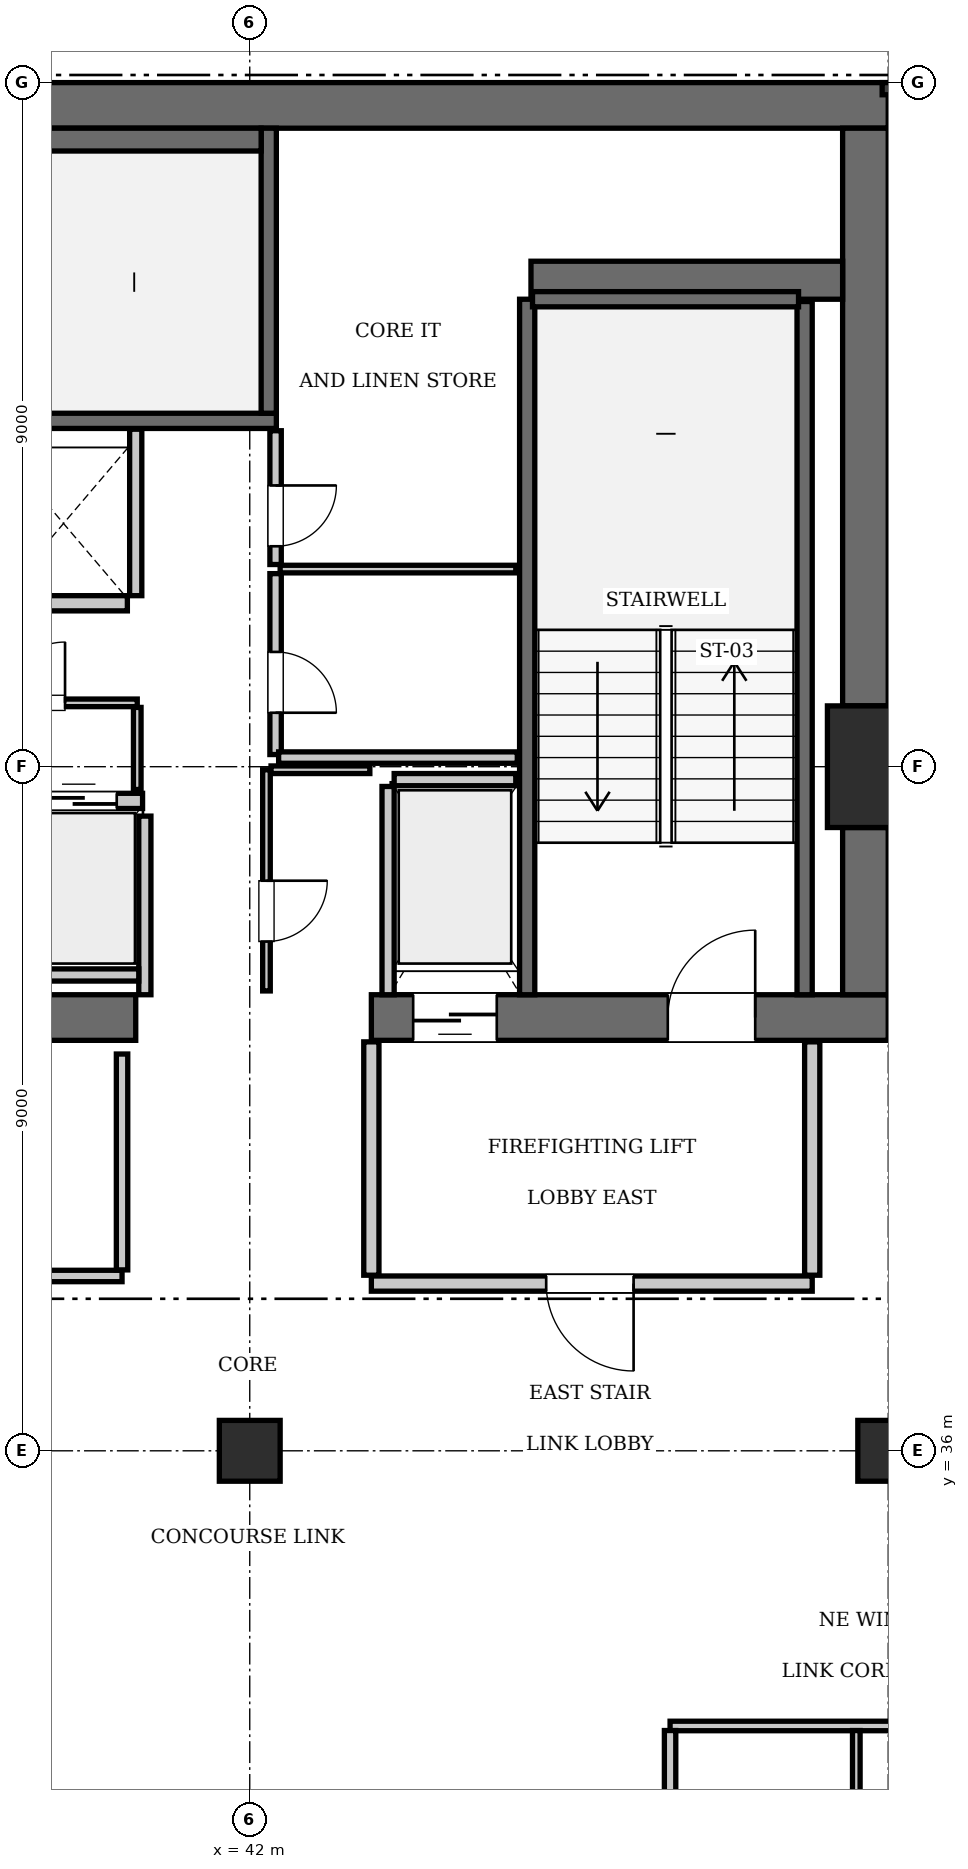
"""IFC4 building model, lengths in metres.
Left out: names, types, materials, properties, quantities, classifications, styles, units other than length and angle.
Written with IfcOpenShell. Run it as: python <this file> out.ifc"""

import sys

from ifc_helpers import new_model, si_unit, direction, frame, frame_2d, origin, origin_2d, place, context, subcontext, project, spatial, rectangle, extrude, element, fill, save


model = new_model("IFC4")
c1 = context("Model", 3, precision=1e-05, world=origin(), true_north=direction((0.0, 1.0)))
c2 = subcontext(c1, "Body", "Model", "MODEL_VIEW")
j1 = project(units=[si_unit("LENGTHUNIT", "METRE"), si_unit("PLANEANGLEUNIT", "RADIAN")], contexts=[c1])
p1 = place(None, origin())
s1 = spatial("IfcSite", under=j1, at=p1, CompositionType="ELEMENT")
p2 = place(p1, origin())
s2 = spatial("IfcBuilding", under=s1, at=p2, CompositionType="ELEMENT")
p3 = place(p2, frame((0.0, 0.0, 312.55)))
s3 = spatial("IfcBuildingStorey", under=s2, at=p3, CompositionType="ELEMENT", Elevation=312.55)
p4 = place(p3, frame((50.4, 45.0, 0.0), z_axis=(0.0, 0.0, 1.0), x_axis=(1.0, 0.0, 0.0)))
e1 = element("IfcColumn", 1, at=p4, inside=s3, PredefinedType="COLUMN", context=c2, shape_type="SweptSolid", body=[
    extrude(rectangle(XDim=1.6, YDim=1.6, at=origin_2d()), origin(), (0.0, 0.0, 1.0), 3.85),
])
p5 = place(p3, frame((25.2, 53.7, 0.0), z_axis=(0.0, 0.0, 1.0), x_axis=(1.0, 0.0, 0.0)))
e2 = element("IfcWall", 2, at=p5, inside=s3, PredefinedType="SHEAR", context=c2, shape_type="SweptSolid", body=[
    extrude(rectangle(XDim=25.2, YDim=0.6, at=frame_2d((12.6, 0.0))), origin(), (0.0, 0.0, 1.0), 3.85),
])
p6 = place(p3, frame((35.1, 41.7, 0.0), z_axis=(0.0, 0.0, 1.0), x_axis=(1.0, 0.0, 0.0)))
e3 = element("IfcWall", 3, at=p6, inside=s3, PredefinedType="SHEAR", context=c2, shape_type="SweptSolid", body=[
    extrude(rectangle(XDim=5.4, YDim=0.6, at=frame_2d((2.7, 0.0))), origin(), (0.0, 0.0, 1.0), 3.85),
])
p7 = place(p3, frame((43.6, 41.7, 0.0), z_axis=(0.0, 0.0, 1.0), x_axis=(1.0, 0.0, 0.0)))
e4 = element("IfcWall", 4, at=p7, inside=s3, PredefinedType="SHEAR", context=c2, shape_type="SweptSolid", body=[
    extrude(rectangle(XDim=6.8, YDim=0.6, at=frame_2d((3.4, 0.0))), origin(), (0.0, 0.0, 1.0), 3.85),
])
p8 = place(p7, frame((3.9, 0.0, 0.0)))
e5 = element("IfcOpeningElement", 5, at=p8, cuts=e4, PredefinedType="OPENING", context=c2, shape_type="SweptSolid", body=[
    extrude(rectangle(XDim=1.15, YDim=2.15, at=frame_2d((0.575, 1.075))), frame((0.0, 0.31, 0.0), z_axis=(0.0, -1.0, 0.0), x_axis=(1.0, 0.0, 0.0)), (0.0, 0.0, 1.0), 0.62),
])
p9 = place(p7, frame((0.55, 0.0, 0.0)))
e6 = element("IfcOpeningElement", 6, at=p9, cuts=e4, PredefinedType="OPENING", context=c2, shape_type="SweptSolid", body=[
    extrude(rectangle(XDim=1.1, YDim=2.2, at=frame_2d((0.55, 1.1))), frame((0.0, 0.31, 0.0), z_axis=(0.0, -1.0, 0.0), x_axis=(1.0, 0.0, 0.0)), (0.0, 0.0, 1.0), 0.62),
])
p10 = place(p3, frame((50.1, 42.0, 0.0), z_axis=(0.0, 0.0, 1.0), x_axis=(0.0, 1.0, 0.0)))
e7 = element("IfcWall", 7, at=p10, inside=s3, PredefinedType="SHEAR", context=c2, shape_type="SweptSolid", body=[
    extrude(rectangle(XDim=2.2, YDim=0.6, at=frame_2d((1.1, 0.0))), origin(), (0.0, 0.0, 1.0), 3.85),
])
p11 = place(p3, frame((50.1, 45.8, 0.0), z_axis=(0.0, 0.0, 1.0), x_axis=(0.0, 1.0, 0.0)))
e8 = element("IfcWall", 8, at=p11, inside=s3, PredefinedType="SHEAR", context=c2, shape_type="SweptSolid", body=[
    extrude(rectangle(XDim=7.6, YDim=0.6, at=frame_2d((3.8, 0.0))), origin(), (0.0, 0.0, 1.0), 3.85),
])
p12 = place(p3, frame((45.7, 51.4, 0.0), z_axis=(0.0, 0.0, 1.0), x_axis=(1.0, 0.0, 0.0)))
e9 = element("IfcWall", 9, at=p12, inside=s3, PredefinedType="SHEAR", context=c2, shape_type="SweptSolid", body=[
    extrude(rectangle(XDim=4.1, YDim=0.5, at=frame_2d((2.05, 0.0))), origin(), (0.0, 0.0, 1.0), 3.85),
])
for number, where, z_axis, x_axis in (
    (10, (42.0, 36.0, 0.0), (0.0, 0.0, 1.0), (1.0, 0.0, 0.0)),
    (11, (50.4, 36.0, 0.0), (0.0, 0.0, 1.0), (1.0, 0.0, 0.0)),
):
    element("IfcColumn", number, at=place(p3, frame(where, z_axis=z_axis, x_axis=x_axis)), inside=s3, PredefinedType="COLUMN", context=c2, shape_type="SweptSolid", body=[
        extrude(rectangle(XDim=0.8, YDim=0.8, at=origin_2d()), origin(), (0.0, 0.0, 1.0), 3.85),
    ])
p13 = place(p3, frame((33.25, 49.55, 0.0), z_axis=(0.0, 0.0, 1.0), x_axis=(1.0, 0.0, 0.0)))
e12 = element("IfcWall", 12, at=p13, inside=s3, PredefinedType="SOLIDWALL", context=c2, shape_type="SweptSolid", body=[
    extrude(rectangle(XDim=9.1, YDim=0.2, at=frame_2d((4.55, 0.0))), origin(), (0.0, 0.0, 1.0), 3.55),
])
p14 = place(p3, frame((42.25, 49.65, 0.0), z_axis=(0.0, 0.0, 1.0), x_axis=(0.0, 1.0, 0.0)))
e13 = element("IfcWall", 13, at=p14, inside=s3, PredefinedType="SOLIDWALL", context=c2, shape_type="SweptSolid", body=[
    extrude(rectangle(XDim=3.75, YDim=0.2, at=frame_2d((1.875, 0.0))), origin(), (0.0, 0.0, 1.0), 3.55),
])
p15 = place(p3, frame((33.45, 53.25, 0.0), z_axis=(0.0, 0.0, 1.0), x_axis=(1.0, 0.0, 0.0)))
e14 = element("IfcWall", 14, at=p15, inside=s3, PredefinedType="SOLIDWALL", context=c2, shape_type="SweptSolid", body=[
    extrude(rectangle(XDim=8.7, YDim=0.3, at=frame_2d((4.35, 0.0))), origin(), (0.0, 0.0, 1.0), 3.55),
])
p16 = place(p3, frame((45.65, 42.0, 0.0), z_axis=(0.0, 0.0, 1.0), x_axis=(0.0, 1.0, 0.0)))
e15 = element("IfcWall", 15, at=p16, inside=s3, PredefinedType="SOLIDWALL", context=c2, shape_type="SweptSolid", body=[
    extrude(rectangle(XDim=9.15, YDim=0.2, at=frame_2d((4.575, 0.0))), origin(), (0.0, 0.0, 1.0), 3.55),
])
p17 = place(p3, frame((49.3, 42.0, 0.0), z_axis=(0.0, 0.0, 1.0), x_axis=(0.0, 1.0, 0.0)))
e16 = element("IfcWall", 16, at=p17, inside=s3, PredefinedType="SOLIDWALL", context=c2, shape_type="SweptSolid", body=[
    extrude(rectangle(XDim=9.12, YDim=0.2, at=frame_2d((4.56, 0.0))), origin(), (0.0, 0.0, 1.0), 3.55),
])
p18 = place(p3, frame((45.72, 51.15, 0.0), z_axis=(0.0, 0.0, 1.0), x_axis=(1.0, 0.0, 0.0)))
e17 = element("IfcWall", 17, at=p18, inside=s3, PredefinedType="SOLIDWALL", context=c2, shape_type="SweptSolid", body=[
    extrude(rectangle(XDim=3.5, YDim=0.2, at=frame_2d((1.75, 0.0))), origin(), (0.0, 0.0, 1.0), 3.55),
])
p19 = place(p3, frame((38.91, 44.55, 0.0), z_axis=(0.0, 0.0, 1.0), x_axis=(1.0, 0.0, 0.0)))
e18 = element("IfcWall", 18, at=p19, inside=s3, PredefinedType="SOLIDWALL", context=c2, shape_type="SweptSolid", body=[
    extrude(rectangle(XDim=1.68, YDim=0.2, at=frame_2d((0.84, 0.0))), origin(), (0.0, 0.0, 1.0), 3.55),
])
p20 = place(p19, frame((0.34, 0.0, 0.0)))
e19 = element("IfcOpeningElement", 19, at=p20, cuts=e18, PredefinedType="OPENING", context=c2, shape_type="SweptSolid", body=[
    extrude(rectangle(XDim=1.0, YDim=2.15, at=frame_2d((0.5, 1.075))), frame((0.0, 0.11, 0.0), z_axis=(0.0, -1.0, 0.0), x_axis=(1.0, 0.0, 0.0)), (0.0, 0.0, 1.0), 0.22),
])
p21 = place(p3, frame((38.71, 47.15, 0.0), z_axis=(0.0, 0.0, 1.0), x_axis=(1.0, 0.0, 0.0)))
e20 = element("IfcWall", 20, at=p21, inside=s3, PredefinedType="SOLIDWALL", context=c2, shape_type="SweptSolid", body=[
    extrude(rectangle(XDim=1.68, YDim=0.2, at=frame_2d((0.84, 0.0))), origin(), (0.0, 0.0, 1.0), 3.55),
])
p22 = place(p3, frame((43.9, 44.83, 0.0), z_axis=(0.0, 0.0, 1.0), x_axis=(1.0, 0.0, 0.0)))
e21 = element("IfcWall", 21, at=p22, inside=s3, PredefinedType="SOLIDWALL", context=c2, shape_type="SweptSolid", body=[
    extrude(rectangle(XDim=1.6, YDim=0.16, at=frame_2d((0.8, 0.0))), origin(), (0.0, 0.0, 1.0), 3.55),
])
p23 = place(p3, frame((43.82, 42.0, 0.0), z_axis=(0.0, 0.0, 1.0), x_axis=(0.0, 1.0, 0.0)))
e22 = element("IfcWall", 22, at=p23, inside=s3, PredefinedType="SOLIDWALL", context=c2, shape_type="SweptSolid", body=[
    extrude(rectangle(XDim=2.74, YDim=0.16, at=frame_2d((1.37, 0.0))), origin(), (0.0, 0.0, 1.0), 3.55),
])
p24 = place(p3, frame((40.62, 42.0, 0.0), z_axis=(0.0, 0.0, 1.0), x_axis=(0.0, 1.0, 0.0)))
e23 = element("IfcWall", 23, at=p24, inside=s3, PredefinedType="SOLIDWALL", context=c2, shape_type="SweptSolid", body=[
    extrude(rectangle(XDim=2.35, YDim=0.16, at=frame_2d((1.175, 0.0))), origin(), (0.0, 0.0, 1.0), 3.55),
])
p25 = place(p3, frame((35.52, 42.26, 0.0), z_axis=(0.0, 0.0, 1.0), x_axis=(1.0, 0.0, 0.0)))
e24 = element("IfcWall", 24, at=p25, inside=s3, PredefinedType="SOLIDWALL", context=c2, shape_type="SweptSolid", body=[
    extrude(rectangle(XDim=5.02, YDim=0.16, at=frame_2d((2.51, 0.0))), origin(), (0.0, 0.0, 1.0), 3.55),
])
p26 = place(p3, frame((40.5, 47.25, 0.0), z_axis=(0.0, 0.0, 1.0), x_axis=(0.0, 1.0, 0.0)))
e25 = element("IfcWall", 25, at=p26, inside=s3, PredefinedType="SOLIDWALL", context=c2, shape_type="SweptSolid", body=[
    extrude(rectangle(XDim=2.19, YDim=0.16, at=frame_2d((1.095, 0.0))), origin(), (0.0, 0.0, 1.0), 3.55),
])
p27 = place(p3, frame((43.6, 38.2, 0.0), z_axis=(0.0, 0.0, 1.0), x_axis=(1.0, 0.0, 0.0)))
e26 = element("IfcWall", 26, at=p27, inside=s3, PredefinedType="PARTITIONING", context=c2, shape_type="SweptSolid", body=[
    extrude(rectangle(XDim=5.8, YDim=0.2, at=frame_2d((2.9, 0.0))), origin(), (0.0, 0.0, 1.0), 3.55),
])
p28 = place(p27, frame((2.3, 0.0, 0.0)))
e27 = element("IfcOpeningElement", 27, at=p28, cuts=e26, PredefinedType="OPENING", context=c2, shape_type="SweptSolid", body=[
    extrude(rectangle(XDim=1.15, YDim=2.15, at=frame_2d((0.575, 1.075))), frame((0.0, 0.11, 0.0), z_axis=(0.0, -1.0, 0.0), x_axis=(1.0, 0.0, 0.0)), (0.0, 0.0, 1.0), 0.22),
])
for number, where, z_axis, x_axis in (
    (28, (43.6, 38.31, 0.0), (0.0, 0.0, 1.0), (0.0, 1.0, 0.0)),
    (29, (49.4, 38.31, 0.0), (0.0, 0.0, 1.0), (0.0, 1.0, 0.0)),
):
    element("IfcWall", number, at=place(p3, frame(where, z_axis=z_axis, x_axis=x_axis)), inside=s3, PredefinedType="PARTITIONING", context=c2, shape_type="SweptSolid", body=[
        extrude(rectangle(XDim=3.07, YDim=0.2, at=frame_2d((1.535, 0.0))), origin(), (0.0, 0.0, 1.0), 3.55),
    ])
p29 = place(p3, frame((38.02, 45.84, 0.0), z_axis=(0.0, 0.0, 1.0), x_axis=(1.0, 0.0, 0.0)))
e30 = element("IfcWall", 30, at=p29, inside=s3, PredefinedType="PARTITIONING", context=c2, shape_type="SweptSolid", body=[
    extrude(rectangle(XDim=2.5, YDim=0.1, at=frame_2d((1.25, 0.0))), origin(), (0.0, 0.0, 1.0), 3.55),
])
p30 = place(p29, frame((0.75, 0.0, 0.0)))
e31 = element("IfcOpeningElement", 31, at=p30, cuts=e30, PredefinedType="OPENING", context=c2, shape_type="SweptSolid", body=[
    extrude(rectangle(XDim=0.8, YDim=2.05, at=frame_2d((0.4, 1.025))), frame((0.0, 0.06, 0.0), z_axis=(0.0, -1.0, 0.0), x_axis=(1.0, 0.0, 0.0)), (0.0, 0.0, 1.0), 0.12),
])
p31 = place(p3, frame((40.52, 44.7, 0.0), z_axis=(0.0, 0.0, 1.0), x_axis=(0.0, 1.0, 0.0)))
e32 = element("IfcWall", 32, at=p31, inside=s3, PredefinedType="PARTITIONING", context=c2, shape_type="SweptSolid", body=[
    extrude(rectangle(XDim=1.08, YDim=0.1, at=frame_2d((0.54, 0.0))), origin(), (0.0, 0.0, 1.0), 3.55),
])
p32 = place(p3, frame((42.22, 42.05, 0.0), z_axis=(0.0, 0.0, 1.0), x_axis=(0.0, 1.0, 0.0)))
e33 = element("IfcWall", 33, at=p32, inside=s3, PredefinedType="PARTITIONING", context=c2, shape_type="SweptSolid", body=[
    extrude(rectangle(XDim=2.91, YDim=0.1, at=frame_2d((1.455, 0.0))), origin(), (0.0, 0.0, 1.0), 3.55),
])
p33 = place(p32, frame((0.65, 0.0, 0.0)))
e34 = element("IfcOpeningElement", 34, at=p33, cuts=e33, PredefinedType="OPENING", context=c2, shape_type="SweptSolid", body=[
    extrude(rectangle(XDim=0.8, YDim=2.05, at=frame_2d((0.4, 1.025))), frame((0.0, 0.06, 0.0), z_axis=(0.0, -1.0, 0.0), x_axis=(1.0, 0.0, 0.0)), (0.0, 0.0, 1.0), 0.12),
])
p34 = place(p3, frame((42.28, 44.96, 0.0), z_axis=(0.0, 0.0, 1.0), x_axis=(1.0, 0.0, 0.0)))
e35 = element("IfcWall", 35, at=p34, inside=s3, PredefinedType="PARTITIONING", context=c2, shape_type="SweptSolid", body=[
    extrude(rectangle(XDim=1.3, YDim=0.1, at=frame_2d((0.65, 0.0))), origin(), (0.0, 0.0, 1.0), 3.55),
])
p35 = place(p3, frame((42.34, 45.16, 0.0), z_axis=(0.0, 0.0, 1.0), x_axis=(0.0, 1.0, 0.0)))
e36 = element("IfcWall", 36, at=p35, inside=s3, PredefinedType="PARTITIONING", context=c2, shape_type="SweptSolid", body=[
    extrude(rectangle(XDim=2.38, YDim=0.15, at=frame_2d((1.19, 0.0))), origin(), (0.0, 0.0, 1.0), 3.55),
])
p36 = place(p35, frame((0.55, 0.0, 0.0)))
e37 = element("IfcOpeningElement", 37, at=p36, cuts=e36, PredefinedType="OPENING", context=c2, shape_type="SweptSolid", body=[
    extrude(rectangle(XDim=0.8, YDim=2.05, at=frame_2d((0.4, 1.025))), frame((0.0, 0.085, 0.0), z_axis=(0.0, -1.0, 0.0), x_axis=(1.0, 0.0, 0.0)), (0.0, 0.0, 1.0), 0.17),
])
p37 = place(p3, frame((42.34, 47.66, 0.0), z_axis=(0.0, 0.0, 1.0), x_axis=(0.0, 1.0, 0.0)))
e38 = element("IfcWall", 38, at=p37, inside=s3, PredefinedType="PARTITIONING", context=c2, shape_type="SweptSolid", body=[
    extrude(rectangle(XDim=1.76, YDim=0.15, at=frame_2d((0.88, 0.0))), origin(), (0.0, 0.0, 1.0), 3.55),
])
p38 = place(p37, frame((0.24, 0.0, 0.0)))
e39 = element("IfcOpeningElement", 39, at=p38, cuts=e38, PredefinedType="OPENING", context=c2, shape_type="SweptSolid", body=[
    extrude(rectangle(XDim=0.8, YDim=2.05, at=frame_2d((0.4, 1.025))), frame((0.0, 0.085, 0.0), z_axis=(0.0, -1.0, 0.0), x_axis=(1.0, 0.0, 0.0)), (0.0, 0.0, 1.0), 0.17),
])
p39 = place(p3, frame((42.4, 47.6, 0.0), z_axis=(0.0, 0.0, 1.0), x_axis=(1.0, 0.0, 0.0)))
e40 = element("IfcWall", 40, at=p39, inside=s3, PredefinedType="PARTITIONING", context=c2, shape_type="SweptSolid", body=[
    extrude(rectangle(XDim=3.1, YDim=0.1, at=frame_2d((1.55, 0.0))), origin(), (0.0, 0.0, 1.0), 3.55),
])
p40 = place(p3, frame((42.38, 45.12, 0.0), z_axis=(0.0, 0.0, 1.0), x_axis=(1.0, 0.0, 0.0)))
e41 = element("IfcWall", 41, at=p40, inside=s3, PredefinedType="PARTITIONING", context=c2, shape_type="SweptSolid", body=[
    extrude(rectangle(XDim=3.14, YDim=0.15, at=frame_2d((1.57, 0.0))), origin(), (0.0, 0.0, 1.0), 3.55),
])
p41 = place(p3, frame((37.38, 38.3, 0.0), z_axis=(0.0, 0.0, 1.0), x_axis=(1.0, 0.0, 0.0)))
e42 = element("IfcWall", 42, at=p41, inside=s3, PredefinedType="PARTITIONING", context=c2, shape_type="SweptSolid", body=[
    extrude(rectangle(XDim=2.94, YDim=0.15, at=frame_2d((1.47, 0.0))), origin(), (0.0, 0.0, 1.0), 3.55),
])
p42 = place(p41, frame((1.0, 0.0, 0.0)))
e43 = element("IfcOpeningElement", 43, at=p42, cuts=e42, PredefinedType="OPENING", context=c2, shape_type="SweptSolid", body=[
    extrude(rectangle(XDim=0.8, YDim=2.05, at=frame_2d((0.4, 1.025))), frame((0.0, 0.085, 0.0), z_axis=(0.0, -1.0, 0.0), x_axis=(1.0, 0.0, 0.0)), (0.0, 0.0, 1.0), 0.17),
])
p43 = place(p3, frame((40.32, 38.38, 0.0), z_axis=(0.0, 0.0, 1.0), x_axis=(0.0, 1.0, 0.0)))
e44 = element("IfcWall", 44, at=p43, inside=s3, PredefinedType="PARTITIONING", context=c2, shape_type="SweptSolid", body=[
    extrude(rectangle(XDim=2.84, YDim=0.15, at=frame_2d((1.42, 0.0))), origin(), (0.0, 0.0, 1.0), 3.55),
])
p44 = place(p3, frame((47.53, 32.38, 0.0), z_axis=(0.0, 0.0, 1.0), x_axis=(1.0, 0.0, 0.0)))
e45 = element("IfcWall", 45, at=p44, inside=s3, PredefinedType="PARTITIONING", context=c2, shape_type="SweptSolid", body=[
    extrude(rectangle(XDim=12.57, YDim=0.125, at=frame_2d((6.285, 0.0))), origin(), (0.0, 0.0, 1.0), 3.55),
])
p45 = place(p3, frame((47.53, 30.43, 0.0), z_axis=(0.0, 0.0, 1.0), x_axis=(0.0, 1.0, 0.0)))
e46 = element("IfcWall", 46, at=p45, inside=s3, PredefinedType="PARTITIONING", context=c2, shape_type="SweptSolid", body=[
    extrude(rectangle(XDim=1.89, YDim=0.15, at=frame_2d((0.945, 0.0))), origin(), (0.0, 0.0, 1.0), 3.55),
])
p46 = place(p3, frame((49.98, 30.43, 0.0), z_axis=(0.0, 0.0, 1.0), x_axis=(0.0, 1.0, 0.0)))
e47 = element("IfcWall", 47, at=p46, inside=s3, PredefinedType="PARTITIONING", context=c2, shape_type="SweptSolid", body=[
    extrude(rectangle(XDim=1.89, YDim=0.1, at=frame_2d((0.945, 0.0))), origin(), (0.0, 0.0, 1.0), 3.55),
])
p47 = place(p8, origin())
e48 = element("IfcDoor", 48, at=p47, inside=s3, OperationType="SINGLE_SWING_RIGHT", PredefinedType="DOOR", context=c2, shape_type="SweptSolid", body=[
    extrude(rectangle(XDim=1.15, YDim=2.15, at=frame_2d((0.575, 1.075))), frame((0.0, 0.025, 0.0), z_axis=(0.0, -1.0, 0.0), x_axis=(1.0, 0.0, 0.0)), (0.0, 0.0, 1.0), 0.05),
])
fill(e5, e48)
p48 = place(p20, origin())
e49 = element("IfcDoor", 49, at=p48, inside=s3, OperationType="SLIDING_TO_LEFT", PredefinedType="DOOR", context=c2, shape_type="SweptSolid", body=[
    extrude(rectangle(XDim=1.0, YDim=2.15, at=frame_2d((0.5, 1.075))), frame((0.0, 0.025, 0.0), z_axis=(0.0, -1.0, 0.0), x_axis=(1.0, 0.0, 0.0)), (0.0, 0.0, 1.0), 0.05),
])
fill(e19, e49)
p49 = place(p9, frame((1.1, 0.0, 0.0), z_axis=(0.0, 0.0, 1.0), x_axis=(-1.0, 0.0, 0.0)))
e50 = element("IfcDoor", 50, at=p49, inside=s3, OperationType="SLIDING_TO_LEFT", PredefinedType="DOOR", context=c2, shape_type="SweptSolid", body=[
    extrude(rectangle(XDim=1.1, YDim=2.2, at=frame_2d((0.55, 1.1))), frame((0.0, 0.025, 0.0), z_axis=(0.0, -1.0, 0.0), x_axis=(1.0, 0.0, 0.0)), (0.0, 0.0, 1.0), 0.05),
])
fill(e6, e50)
p50 = place(p28, frame((1.15, 0.0, 0.0), z_axis=(0.0, 0.0, 1.0), x_axis=(-1.0, 0.0, 0.0)))
e51 = element("IfcDoor", 51, at=p50, inside=s3, OperationType="SINGLE_SWING_LEFT", PredefinedType="DOOR", context=c2, shape_type="SweptSolid", body=[
    extrude(rectangle(XDim=1.15, YDim=2.15, at=frame_2d((0.575, 1.075))), frame((0.0, 0.025, 0.0), z_axis=(0.0, -1.0, 0.0), x_axis=(1.0, 0.0, 0.0)), (0.0, 0.0, 1.0), 0.05),
])
fill(e27, e51)
p51 = place(p30, origin())
e52 = element("IfcDoor", 52, at=p51, inside=s3, OperationType="SINGLE_SWING_RIGHT", PredefinedType="DOOR", context=c2, shape_type="SweptSolid", body=[
    extrude(rectangle(XDim=0.8, YDim=2.05, at=frame_2d((0.4, 1.025))), frame((0.0, 0.025, 0.0), z_axis=(0.0, -1.0, 0.0), x_axis=(1.0, 0.0, 0.0)), (0.0, 0.0, 1.0), 0.05),
])
fill(e31, e52)
p52 = place(p33, frame((0.8, 0.0, 0.0), z_axis=(0.0, 0.0, 1.0), x_axis=(-1.0, 0.0, 0.0)))
e53 = element("IfcDoor", 53, at=p52, inside=s3, OperationType="SINGLE_SWING_LEFT", PredefinedType="DOOR", context=c2, shape_type="SweptSolid", body=[
    extrude(rectangle(XDim=0.8, YDim=2.05, at=frame_2d((0.4, 1.025))), frame((0.0, 0.025, 0.0), z_axis=(0.0, -1.0, 0.0), x_axis=(1.0, 0.0, 0.0)), (0.0, 0.0, 1.0), 0.05),
])
fill(e34, e53)
p53 = place(p36, frame((0.8, 0.0, 0.0), z_axis=(0.0, 0.0, 1.0), x_axis=(-1.0, 0.0, 0.0)))
e54 = element("IfcDoor", 54, at=p53, inside=s3, OperationType="SINGLE_SWING_RIGHT", PredefinedType="DOOR", context=c2, shape_type="SweptSolid", body=[
    extrude(rectangle(XDim=0.8, YDim=2.05, at=frame_2d((0.4, 1.025))), frame((0.0, 0.025, 0.0), z_axis=(0.0, -1.0, 0.0), x_axis=(1.0, 0.0, 0.0)), (0.0, 0.0, 1.0), 0.05),
])
fill(e37, e54)
p54 = place(p38, frame((0.8, 0.0, 0.0), z_axis=(0.0, 0.0, 1.0), x_axis=(-1.0, 0.0, 0.0)))
e55 = element("IfcDoor", 55, at=p54, inside=s3, OperationType="SINGLE_SWING_LEFT", PredefinedType="DOOR", context=c2, shape_type="SweptSolid", body=[
    extrude(rectangle(XDim=0.8, YDim=2.05, at=frame_2d((0.4, 1.025))), frame((0.0, 0.025, 0.0), z_axis=(0.0, -1.0, 0.0), x_axis=(1.0, 0.0, 0.0)), (0.0, 0.0, 1.0), 0.05),
])
fill(e39, e55)
save(model, sys.argv[1])
